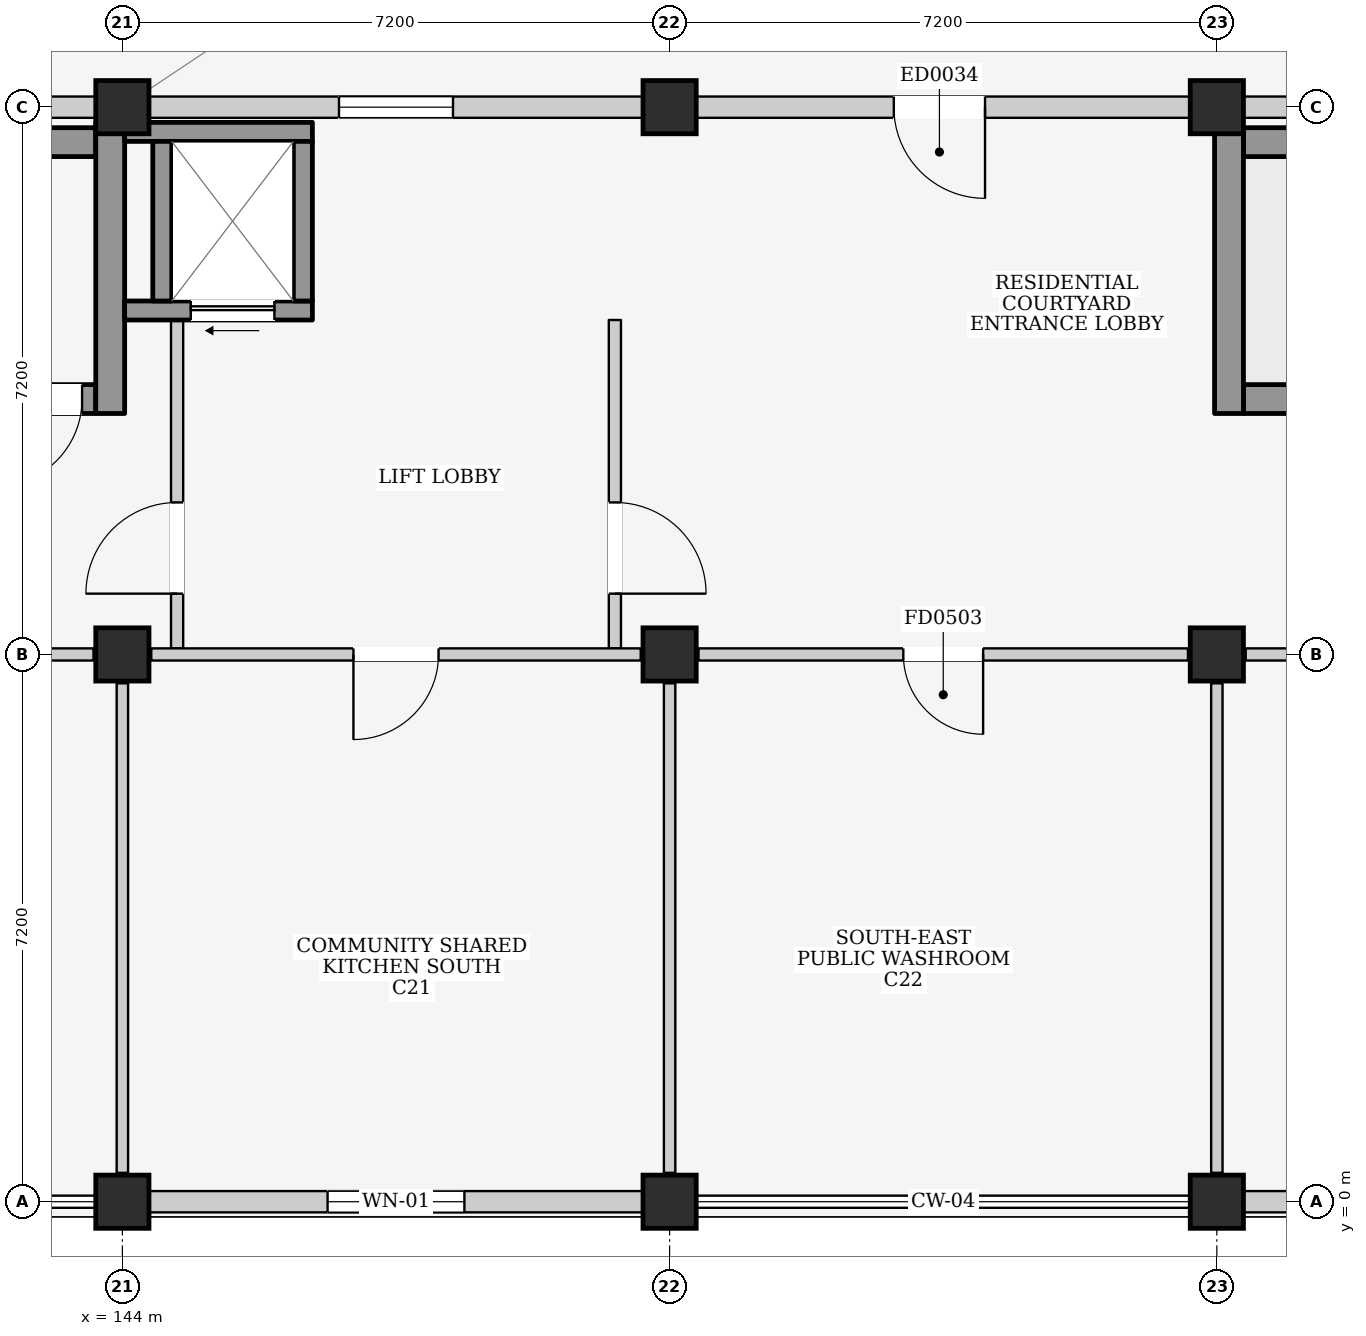
"""IFC4 building model, lengths in metres.
Left out: names, types, materials, properties, quantities, classifications, styles, units other than length and angle.
Written with IfcOpenShell. Run it as: python <this file> out.ifc"""

import sys

from ifc_helpers import new_model, si_unit, direction, frame, frame_2d, origin, origin_2d, place, context, subcontext, project, spatial, rectangle, extrude, element, fill, save


model = new_model("IFC4")
c1 = context("Model", 3, precision=1e-05, world=origin(), true_north=direction((0.0, 1.0)))
c2 = subcontext(c1, "Body", "Model", "MODEL_VIEW")
j1 = project(units=[si_unit("LENGTHUNIT", "METRE"), si_unit("PLANEANGLEUNIT", "RADIAN")], contexts=[c1])
p1 = place(None, origin())
s1 = spatial("IfcSite", under=j1, at=p1, CompositionType="ELEMENT")
p2 = place(p1, origin())
s2 = spatial("IfcBuilding", under=s1, at=p2, CompositionType="ELEMENT")
p3 = place(p2, origin())
s3 = spatial("IfcBuildingStorey", under=s2, at=p3, CompositionType="ELEMENT", Elevation=0.0)
for number, where, z_axis, x_axis in (
    (1, (144.0, 0.0, 0.0), (0.0, 0.0, 1.0), (1.0, 0.0, 0.0)),
    (2, (144.0, 7.2, 0.0), (0.0, 0.0, 1.0), (1.0, 0.0, 0.0)),
    (3, (144.0, 14.4, 0.0), (0.0, 0.0, 1.0), (1.0, 0.0, 0.0)),
    (4, (151.2, 0.0, 0.0), (0.0, 0.0, 1.0), (1.0, 0.0, 0.0)),
    (5, (151.2, 7.2, 0.0), (0.0, 0.0, 1.0), (1.0, 0.0, 0.0)),
    (6, (151.2, 14.4, 0.0), (0.0, 0.0, 1.0), (1.0, 0.0, 0.0)),
    (7, (158.4, 0.0, 0.0), (0.0, 0.0, 1.0), (1.0, 0.0, 0.0)),
    (8, (158.4, 7.2, 0.0), (0.0, 0.0, 1.0), (1.0, 0.0, 0.0)),
    (9, (158.4, 14.4, 0.0), (0.0, 0.0, 1.0), (1.0, 0.0, 0.0)),
):
    element("IfcColumn", number, at=place(p3, frame(where, z_axis=z_axis, x_axis=x_axis)), inside=s3, PredefinedType="COLUMN", context=c2, shape_type="SweptSolid", body=[
        extrude(rectangle(XDim=0.7, YDim=0.7, at=origin_2d()), origin(), (0.0, 0.0, 1.0), 4.5),
    ])
p4 = place(p3, frame((137.15, 14.4, 0.0), z_axis=(0.0, 0.0, 1.0), x_axis=(1.0, 0.0, 0.0)))
e10 = element("IfcWall", 10, at=p4, inside=s3, PredefinedType="ELEMENTEDWALL", context=c2, shape_type="SweptSolid", body=[
    extrude(rectangle(XDim=6.5, YDim=0.28, at=frame_2d((3.25, 0.0))), origin(), (0.0, 0.0, 1.0), 3.435),
])
p5 = place(p4, frame((2.35, 0.0, 0.95)))
e11 = element("IfcOpeningElement", 11, at=p5, cuts=e10, PredefinedType="OPENING", context=c2, shape_type="SweptSolid", body=[
    extrude(rectangle(XDim=1.8, YDim=1.5, at=frame_2d((0.9, 0.75))), frame((0.0, 0.155, 0.0), z_axis=(0.0, -1.0, 0.0), x_axis=(1.0, 0.0, 0.0)), (0.0, 0.0, 1.0), 0.31),
])
p6 = place(p3, frame((144.35, 0.0, 0.0), z_axis=(0.0, 0.0, 1.0), x_axis=(1.0, 0.0, 0.0)))
e12 = element("IfcWall", 12, at=p6, inside=s3, PredefinedType="ELEMENTEDWALL", context=c2, shape_type="SweptSolid", body=[
    extrude(rectangle(XDim=6.5, YDim=0.28, at=frame_2d((3.25, 0.0))), origin(), (0.0, 0.0, 1.0), 3.665),
])
p7 = place(p6, frame((2.35, 0.0, 0.95)))
e13 = element("IfcOpeningElement", 13, at=p7, cuts=e12, PredefinedType="OPENING", context=c2, shape_type="SweptSolid", body=[
    extrude(rectangle(XDim=1.8, YDim=1.5, at=frame_2d((0.9, 0.75))), frame((0.0, 0.155, 0.0), z_axis=(0.0, -1.0, 0.0), x_axis=(1.0, 0.0, 0.0)), (0.0, 0.0, 1.0), 0.31),
])
p8 = place(p3, frame((144.35, 14.4, 0.0), z_axis=(0.0, 0.0, 1.0), x_axis=(1.0, 0.0, 0.0)))
e14 = element("IfcWall", 14, at=p8, inside=s3, PredefinedType="ELEMENTEDWALL", context=c2, shape_type="SweptSolid", body=[
    extrude(rectangle(XDim=6.5, YDim=0.28, at=frame_2d((3.25, 0.0))), origin(), (0.0, 0.0, 1.0), 3.435),
])
p9 = place(p8, frame((2.5, 0.0, 0.95)))
e15 = element("IfcOpeningElement", 15, at=p9, cuts=e14, PredefinedType="OPENING", context=c2, shape_type="SweptSolid", body=[
    extrude(rectangle(XDim=1.5, YDim=1.5, at=frame_2d((0.75, 0.75))), frame((0.0, 0.155, 0.0), z_axis=(0.0, -1.0, 0.0), x_axis=(1.0, 0.0, 0.0)), (0.0, 0.0, 1.0), 0.31),
])
p10 = place(p3, frame((151.55, 14.4, 0.0), z_axis=(0.0, 0.0, 1.0), x_axis=(1.0, 0.0, 0.0)))
e16 = element("IfcWall", 16, at=p10, inside=s3, PredefinedType="ELEMENTEDWALL", context=c2, shape_type="SweptSolid", body=[
    extrude(rectangle(XDim=6.5, YDim=0.28, at=frame_2d((3.25, 0.0))), origin(), (0.0, 0.0, 1.0), 3.435),
])
p11 = place(p10, frame((2.6, 0.0, 0.0)))
e17 = element("IfcOpeningElement", 17, at=p11, cuts=e16, PredefinedType="OPENING", context=c2, shape_type="SweptSolid", body=[
    extrude(rectangle(XDim=1.2, YDim=2.15, at=frame_2d((0.6, 1.075))), frame((0.0, 0.155, 0.0), z_axis=(0.0, -1.0, 0.0), x_axis=(1.0, 0.0, 0.0)), (0.0, 0.0, 1.0), 0.31),
])
p12 = place(p3, frame((158.75, 0.0, 0.0), z_axis=(0.0, 0.0, 1.0), x_axis=(1.0, 0.0, 0.0)))
e18 = element("IfcWall", 18, at=p12, inside=s3, PredefinedType="ELEMENTEDWALL", context=c2, shape_type="SweptSolid", body=[
    extrude(rectangle(XDim=6.5, YDim=0.28, at=frame_2d((3.25, 0.0))), origin(), (0.0, 0.0, 1.0), 3.665),
])
p13 = place(p12, frame((2.65, 0.0, 0.95)))
e19 = element("IfcOpeningElement", 19, at=p13, cuts=e18, PredefinedType="OPENING", context=c2, shape_type="SweptSolid", body=[
    extrude(rectangle(XDim=1.2, YDim=1.35, at=frame_2d((0.6, 0.675))), frame((0.0, 0.155, 0.0), z_axis=(0.0, -1.0, 0.0), x_axis=(1.0, 0.0, 0.0)), (0.0, 0.0, 1.0), 0.31),
])
p14 = place(p3, frame((158.75, 14.4, 0.0), z_axis=(0.0, 0.0, 1.0), x_axis=(1.0, 0.0, 0.0)))
e20 = element("IfcWall", 20, at=p14, inside=s3, PredefinedType="ELEMENTEDWALL", context=c2, shape_type="SweptSolid", body=[
    extrude(rectangle(XDim=6.5, YDim=0.28, at=frame_2d((3.25, 0.0))), origin(), (0.0, 0.0, 1.0), 3.435),
])
p15 = place(p14, frame((2.8, 0.0, 0.95)))
e21 = element("IfcOpeningElement", 21, at=p15, cuts=e20, PredefinedType="OPENING", context=c2, shape_type="SweptSolid", body=[
    extrude(rectangle(XDim=0.9, YDim=1.1, at=frame_2d((0.45, 0.55))), frame((0.0, 0.155, 0.0), z_axis=(0.0, -1.0, 0.0), x_axis=(1.0, 0.0, 0.0)), (0.0, 0.0, 1.0), 0.31),
])
p16 = place(p3, frame((137.15, 10.56, 0.0), z_axis=(0.0, 0.0, 1.0), x_axis=(1.0, 0.0, 0.0)))
e22 = element("IfcWall", 22, at=p16, inside=s3, PredefinedType="SHEAR", context=c2, shape_type="SweptSolid", body=[
    extrude(rectangle(XDim=6.5, YDim=0.38, at=frame_2d((3.25, 0.0))), origin(), (0.0, 0.0, 1.0), 4.2),
])
p17 = place(p16, frame((5.17, 0.0, 0.0)))
e23 = element("IfcOpeningElement", 23, at=p17, cuts=e22, PredefinedType="OPENING", context=c2, shape_type="SweptSolid", body=[
    extrude(rectangle(XDim=1.15, YDim=2.2, at=frame_2d((0.575, 1.1))), frame((0.0, 0.205, 0.0), z_axis=(0.0, -1.0, 0.0), x_axis=(1.0, 0.0, 0.0)), (0.0, 0.0, 1.0), 0.41),
])
p18 = place(p3, frame((137.15, 13.94, 0.0), z_axis=(0.0, 0.0, 1.0), x_axis=(1.0, 0.0, 0.0)))
e24 = element("IfcWall", 24, at=p18, inside=s3, PredefinedType="SHEAR", context=c2, shape_type="SweptSolid", body=[
    extrude(rectangle(XDim=6.5, YDim=0.38, at=frame_2d((3.25, 0.0))), origin(), (0.0, 0.0, 1.0), 4.2),
])
p19 = place(p3, frame((143.84, 10.37, 0.0), z_axis=(0.0, 0.0, 1.0), x_axis=(0.0, 1.0, 0.0)))
e25 = element("IfcWall", 25, at=p19, inside=s3, PredefinedType="SHEAR", context=c2, shape_type="SweptSolid", body=[
    extrude(rectangle(XDim=3.83, YDim=0.38, at=frame_2d((1.915, 0.0))), origin(), (0.0, 0.0, 1.0), 4.2),
])
p20 = place(p3, frame((144.72, 7.28, 0.0), z_axis=(0.0, 0.0, 1.0), x_axis=(0.0, 1.0, 0.0)))
e26 = element("IfcWall", 26, at=p20, inside=s3, PredefinedType="PARTITIONING", context=c2, shape_type="SweptSolid", body=[
    extrude(rectangle(XDim=4.32, YDim=0.16, at=frame_2d((2.16, 0.0))), origin(), (0.0, 0.0, 1.0), 4.2),
])
p21 = place(p20, frame((0.72, 0.0, 0.0)))
e27 = element("IfcOpeningElement", 27, at=p21, cuts=e26, PredefinedType="OPENING", context=c2, shape_type="SweptSolid", body=[
    extrude(rectangle(XDim=1.2, YDim=2.2, at=frame_2d((0.6, 1.1))), frame((0.0, 0.095, 0.0), z_axis=(0.0, -1.0, 0.0), x_axis=(1.0, 0.0, 0.0)), (0.0, 0.0, 1.0), 0.19),
])
p22 = place(p3, frame((150.48, 7.28, 0.0), z_axis=(0.0, 0.0, 1.0), x_axis=(0.0, 1.0, 0.0)))
e28 = element("IfcWall", 28, at=p22, inside=s3, PredefinedType="PARTITIONING", context=c2, shape_type="SweptSolid", body=[
    extrude(rectangle(XDim=4.32, YDim=0.16, at=frame_2d((2.16, 0.0))), origin(), (0.0, 0.0, 1.0), 4.2),
])
p23 = place(p22, frame((0.72, 0.0, 0.0)))
e29 = element("IfcOpeningElement", 29, at=p23, cuts=e28, PredefinedType="OPENING", context=c2, shape_type="SweptSolid", body=[
    extrude(rectangle(XDim=1.2, YDim=2.2, at=frame_2d((0.6, 1.1))), frame((0.0, 0.095, 0.0), z_axis=(0.0, -1.0, 0.0), x_axis=(1.0, 0.0, 0.0)), (0.0, 0.0, 1.0), 0.19),
])
p24 = place(p3, frame((144.03, 11.725, 0.0), z_axis=(0.0, 0.0, 1.0), x_axis=(1.0, 0.0, 0.0)))
e30 = element("IfcWall", 30, at=p24, inside=s3, PredefinedType="SHEAR", context=c2, shape_type="SweptSolid", body=[
    extrude(rectangle(XDim=2.47, YDim=0.25, at=frame_2d((1.235, 0.0))), origin(), (0.0, 0.0, 1.0), 4.2),
])
p25 = place(p24, frame((0.87, 0.0, 0.0)))
e31 = element("IfcOpeningElement", 31, at=p25, cuts=e30, PredefinedType="OPENING", context=c2, shape_type="SweptSolid", body=[
    extrude(rectangle(XDim=1.1, YDim=2.15, at=frame_2d((0.55, 1.075))), frame((0.0, 0.14, 0.0), z_axis=(0.0, -1.0, 0.0), x_axis=(1.0, 0.0, 0.0)), (0.0, 0.0, 1.0), 0.28),
])
p26 = place(p3, frame((144.03, 14.075, 0.0), z_axis=(0.0, 0.0, 1.0), x_axis=(1.0, 0.0, 0.0)))
e32 = element("IfcWall", 32, at=p26, inside=s3, PredefinedType="SHEAR", context=c2, shape_type="SweptSolid", body=[
    extrude(rectangle(XDim=2.47, YDim=0.25, at=frame_2d((1.235, 0.0))), origin(), (0.0, 0.0, 1.0), 4.2),
])
for number, where, z_axis, x_axis in (
    (33, (144.525, 11.85, 0.0), (0.0, 0.0, 1.0), (0.0, 1.0, 0.0)),
    (34, (146.375, 11.85, 0.0), (0.0, 0.0, 1.0), (0.0, 1.0, 0.0)),
):
    element("IfcWall", number, at=place(p3, frame(where, z_axis=z_axis, x_axis=x_axis)), inside=s3, PredefinedType="SHEAR", context=c2, shape_type="SweptSolid", body=[
        extrude(rectangle(XDim=2.1, YDim=0.25, at=frame_2d((1.05, 0.0))), origin(), (0.0, 0.0, 1.0), 4.2),
    ])
p27 = place(p3, frame((158.75, 10.56, 0.0), z_axis=(0.0, 0.0, 1.0), x_axis=(1.0, 0.0, 0.0)))
e35 = element("IfcWall", 35, at=p27, inside=s3, PredefinedType="SHEAR", context=c2, shape_type="SweptSolid", body=[
    extrude(rectangle(XDim=6.5, YDim=0.38, at=frame_2d((3.25, 0.0))), origin(), (0.0, 0.0, 1.0), 4.2),
])
p28 = place(p27, frame((5.17, 0.0, 0.0)))
e36 = element("IfcOpeningElement", 36, at=p28, cuts=e35, PredefinedType="OPENING", context=c2, shape_type="SweptSolid", body=[
    extrude(rectangle(XDim=1.15, YDim=2.2, at=frame_2d((0.575, 1.1))), frame((0.0, 0.205, 0.0), z_axis=(0.0, -1.0, 0.0), x_axis=(1.0, 0.0, 0.0)), (0.0, 0.0, 1.0), 0.41),
])
p29 = place(p3, frame((158.75, 13.94, 0.0), z_axis=(0.0, 0.0, 1.0), x_axis=(1.0, 0.0, 0.0)))
e37 = element("IfcWall", 37, at=p29, inside=s3, PredefinedType="SHEAR", context=c2, shape_type="SweptSolid", body=[
    extrude(rectangle(XDim=6.5, YDim=0.38, at=frame_2d((3.25, 0.0))), origin(), (0.0, 0.0, 1.0), 4.2),
])
p30 = place(p3, frame((158.56, 10.37, 0.0), z_axis=(0.0, 0.0, 1.0), x_axis=(0.0, 1.0, 0.0)))
e38 = element("IfcWall", 38, at=p30, inside=s3, PredefinedType="SHEAR", context=c2, shape_type="SweptSolid", body=[
    extrude(rectangle(XDim=3.76, YDim=0.38, at=frame_2d((1.88, 0.0))), origin(), (0.0, 0.0, 1.0), 4.2),
])
p31 = place(p3, frame((137.18, 7.2, 0.0), z_axis=(0.0, 0.0, 1.0), x_axis=(1.0, 0.0, 0.0)))
e39 = element("IfcWall", 39, at=p31, inside=s3, PredefinedType="PARTITIONING", context=c2, shape_type="SweptSolid", body=[
    extrude(rectangle(XDim=6.44, YDim=0.16, at=frame_2d((3.22, 0.0))), origin(), (0.0, 0.0, 1.0), 3.435),
])
p32 = place(p31, frame((2.66, 0.0, 0.0)))
e40 = element("IfcOpeningElement", 40, at=p32, cuts=e39, PredefinedType="OPENING", context=c2, shape_type="SweptSolid", body=[
    extrude(rectangle(XDim=1.12, YDim=2.2, at=frame_2d((0.56, 1.1))), frame((0.0, 0.095, 0.0), z_axis=(0.0, -1.0, 0.0), x_axis=(1.0, 0.0, 0.0)), (0.0, 0.0, 1.0), 0.19),
])
p33 = place(p3, frame((144.0, 0.38, 0.0), z_axis=(0.0, 0.0, 1.0), x_axis=(0.0, 1.0, 0.0)))
e41 = element("IfcWall", 41, at=p33, inside=s3, PredefinedType="PARTITIONING", context=c2, shape_type="SweptSolid", body=[
    extrude(rectangle(XDim=6.44, YDim=0.15, at=frame_2d((3.22, 0.0))), origin(), (0.0, 0.0, 1.0), 3.435),
])
p34 = place(p3, frame((144.38, 7.2, 0.0), z_axis=(0.0, 0.0, 1.0), x_axis=(1.0, 0.0, 0.0)))
e42 = element("IfcWall", 42, at=p34, inside=s3, PredefinedType="PARTITIONING", context=c2, shape_type="SweptSolid", body=[
    extrude(rectangle(XDim=6.44, YDim=0.16, at=frame_2d((3.22, 0.0))), origin(), (0.0, 0.0, 1.0), 3.435),
])
p35 = place(p34, frame((2.66, 0.0, 0.0)))
e43 = element("IfcOpeningElement", 43, at=p35, cuts=e42, PredefinedType="OPENING", context=c2, shape_type="SweptSolid", body=[
    extrude(rectangle(XDim=1.12, YDim=2.2, at=frame_2d((0.56, 1.1))), frame((0.0, 0.095, 0.0), z_axis=(0.0, -1.0, 0.0), x_axis=(1.0, 0.0, 0.0)), (0.0, 0.0, 1.0), 0.19),
])
p36 = place(p3, frame((151.2, 0.38, 0.0), z_axis=(0.0, 0.0, 1.0), x_axis=(0.0, 1.0, 0.0)))
e44 = element("IfcWall", 44, at=p36, inside=s3, PredefinedType="PARTITIONING", context=c2, shape_type="SweptSolid", body=[
    extrude(rectangle(XDim=6.44, YDim=0.15, at=frame_2d((3.22, 0.0))), origin(), (0.0, 0.0, 1.0), 3.435),
])
p37 = place(p3, frame((151.58, 7.2, 0.0), z_axis=(0.0, 0.0, 1.0), x_axis=(1.0, 0.0, 0.0)))
e45 = element("IfcWall", 45, at=p37, inside=s3, PredefinedType="PARTITIONING", context=c2, shape_type="SweptSolid", body=[
    extrude(rectangle(XDim=6.44, YDim=0.16, at=frame_2d((3.22, 0.0))), origin(), (0.0, 0.0, 1.0), 3.435),
])
p38 = place(p37, frame((2.695, 0.0, 0.0)))
e46 = element("IfcOpeningElement", 46, at=p38, cuts=e45, PredefinedType="OPENING", context=c2, shape_type="SweptSolid", body=[
    extrude(rectangle(XDim=1.05, YDim=2.15, at=frame_2d((0.525, 1.075))), frame((0.0, 0.095, 0.0), z_axis=(0.0, -1.0, 0.0), x_axis=(1.0, 0.0, 0.0)), (0.0, 0.0, 1.0), 0.19),
])
p39 = place(p3, frame((158.4, 0.38, 0.0), z_axis=(0.0, 0.0, 1.0), x_axis=(0.0, 1.0, 0.0)))
e47 = element("IfcWall", 47, at=p39, inside=s3, PredefinedType="PARTITIONING", context=c2, shape_type="SweptSolid", body=[
    extrude(rectangle(XDim=6.44, YDim=0.15, at=frame_2d((3.22, 0.0))), origin(), (0.0, 0.0, 1.0), 3.435),
])
p40 = place(p3, frame((158.78, 7.2, 0.0), z_axis=(0.0, 0.0, 1.0), x_axis=(1.0, 0.0, 0.0)))
e48 = element("IfcWall", 48, at=p40, inside=s3, PredefinedType="PARTITIONING", context=c2, shape_type="SweptSolid", body=[
    extrude(rectangle(XDim=6.44, YDim=0.16, at=frame_2d((3.22, 0.0))), origin(), (0.0, 0.0, 1.0), 3.435),
])
p41 = place(p40, frame((2.695, 0.0, 0.0)))
e49 = element("IfcOpeningElement", 49, at=p41, cuts=e48, PredefinedType="OPENING", context=c2, shape_type="SweptSolid", body=[
    extrude(rectangle(XDim=1.05, YDim=2.15, at=frame_2d((0.525, 1.075))), frame((0.0, 0.095, 0.0), z_axis=(0.0, -1.0, 0.0), x_axis=(1.0, 0.0, 0.0)), (0.0, 0.0, 1.0), 0.19),
])
p42 = place(p7, origin())
e50 = element("IfcWindow", 50, at=p42, inside=s3, PartitioningType="DOUBLE_PANEL_VERTICAL", PredefinedType="WINDOW", context=c2, shape_type="SweptSolid", body=[
    extrude(rectangle(XDim=1.8, YDim=1.5, at=frame_2d((0.9, 0.75))), frame((0.0, 0.03, 0.0), z_axis=(0.0, -1.0, 0.0), x_axis=(1.0, 0.0, 0.0)), (0.0, 0.0, 1.0), 0.06),
])
fill(e13, e50)
p43 = place(p9, origin())
e51 = element("IfcWindow", 51, at=p43, inside=s3, PartitioningType="DOUBLE_PANEL_VERTICAL", PredefinedType="WINDOW", context=c2, shape_type="SweptSolid", body=[
    extrude(rectangle(XDim=1.5, YDim=1.5, at=frame_2d((0.75, 0.75))), frame((0.0, 0.03, 0.0), z_axis=(0.0, -1.0, 0.0), x_axis=(1.0, 0.0, 0.0)), (0.0, 0.0, 1.0), 0.06),
])
fill(e15, e51)
p44 = place(p11, frame((1.2, 0.0, 0.0), z_axis=(0.0, 0.0, 1.0), x_axis=(-1.0, 0.0, 0.0)))
e52 = element("IfcDoor", 52, at=p44, inside=s3, OperationType="SINGLE_SWING_LEFT", PredefinedType="DOOR", context=c2, shape_type="SweptSolid", body=[
    extrude(rectangle(XDim=1.2, YDim=2.15, at=frame_2d((0.6, 1.075))), frame((0.0, 0.025, 0.0), z_axis=(0.0, -1.0, 0.0), x_axis=(1.0, 0.0, 0.0)), (0.0, 0.0, 1.0), 0.05),
])
fill(e17, e52)
p45 = place(p17, frame((1.15, 0.0, 0.0), z_axis=(0.0, 0.0, 1.0), x_axis=(-1.0, 0.0, 0.0)))
e53 = element("IfcDoor", 53, at=p45, inside=s3, OperationType="SINGLE_SWING_RIGHT", PredefinedType="DOOR", context=c2, shape_type="SweptSolid", body=[
    extrude(rectangle(XDim=1.15, YDim=2.2, at=frame_2d((0.575, 1.1))), frame((0.0, 0.025, 0.0), z_axis=(0.0, -1.0, 0.0), x_axis=(1.0, 0.0, 0.0)), (0.0, 0.0, 1.0), 0.05),
])
fill(e23, e53)
p46 = place(p21, origin())
e54 = element("IfcDoor", 54, at=p46, inside=s3, OperationType="SINGLE_SWING_LEFT", PredefinedType="DOOR", context=c2, shape_type="SweptSolid", body=[
    extrude(rectangle(XDim=1.2, YDim=2.2, at=frame_2d((0.6, 1.1))), frame((0.0, 0.025, 0.0), z_axis=(0.0, -1.0, 0.0), x_axis=(1.0, 0.0, 0.0)), (0.0, 0.0, 1.0), 0.05),
])
fill(e27, e54)
p47 = place(p23, frame((1.2, 0.0, 0.0), z_axis=(0.0, 0.0, 1.0), x_axis=(-1.0, 0.0, 0.0)))
e55 = element("IfcDoor", 55, at=p47, inside=s3, OperationType="SINGLE_SWING_RIGHT", PredefinedType="DOOR", context=c2, shape_type="SweptSolid", body=[
    extrude(rectangle(XDim=1.2, YDim=2.2, at=frame_2d((0.6, 1.1))), frame((0.0, 0.025, 0.0), z_axis=(0.0, -1.0, 0.0), x_axis=(1.0, 0.0, 0.0)), (0.0, 0.0, 1.0), 0.05),
])
fill(e29, e55)
p48 = place(p25, frame((1.1, 0.0, 0.0), z_axis=(0.0, 0.0, 1.0), x_axis=(-1.0, 0.0, 0.0)))
e56 = element("IfcDoor", 56, at=p48, inside=s3, OperationType="SLIDING_TO_LEFT", PredefinedType="DOOR", context=c2, shape_type="SweptSolid", body=[
    extrude(rectangle(XDim=1.1, YDim=2.15, at=frame_2d((0.55, 1.075))), frame((0.0, 0.025, 0.0), z_axis=(0.0, -1.0, 0.0), x_axis=(1.0, 0.0, 0.0)), (0.0, 0.0, 1.0), 0.05),
])
fill(e31, e56)
p49 = place(p35, frame((1.12, 0.0, 0.0), z_axis=(0.0, 0.0, 1.0), x_axis=(-1.0, 0.0, 0.0)))
e57 = element("IfcDoor", 57, at=p49, inside=s3, OperationType="SINGLE_SWING_RIGHT", PredefinedType="DOOR", context=c2, shape_type="SweptSolid", body=[
    extrude(rectangle(XDim=1.12, YDim=2.2, at=frame_2d((0.56, 1.1))), frame((0.0, 0.025, 0.0), z_axis=(0.0, -1.0, 0.0), x_axis=(1.0, 0.0, 0.0)), (0.0, 0.0, 1.0), 0.05),
])
fill(e43, e57)
p50 = place(p38, frame((1.05, 0.0, 0.0), z_axis=(0.0, 0.0, 1.0), x_axis=(-1.0, 0.0, 0.0)))
e58 = element("IfcDoor", 58, at=p50, inside=s3, OperationType="SINGLE_SWING_LEFT", PredefinedType="DOOR", context=c2, shape_type="SweptSolid", body=[
    extrude(rectangle(XDim=1.05, YDim=2.15, at=frame_2d((0.525, 1.075))), frame((0.0, 0.025, 0.0), z_axis=(0.0, -1.0, 0.0), x_axis=(1.0, 0.0, 0.0)), (0.0, 0.0, 1.0), 0.05),
])
fill(e46, e58)
save(model, sys.argv[1])
